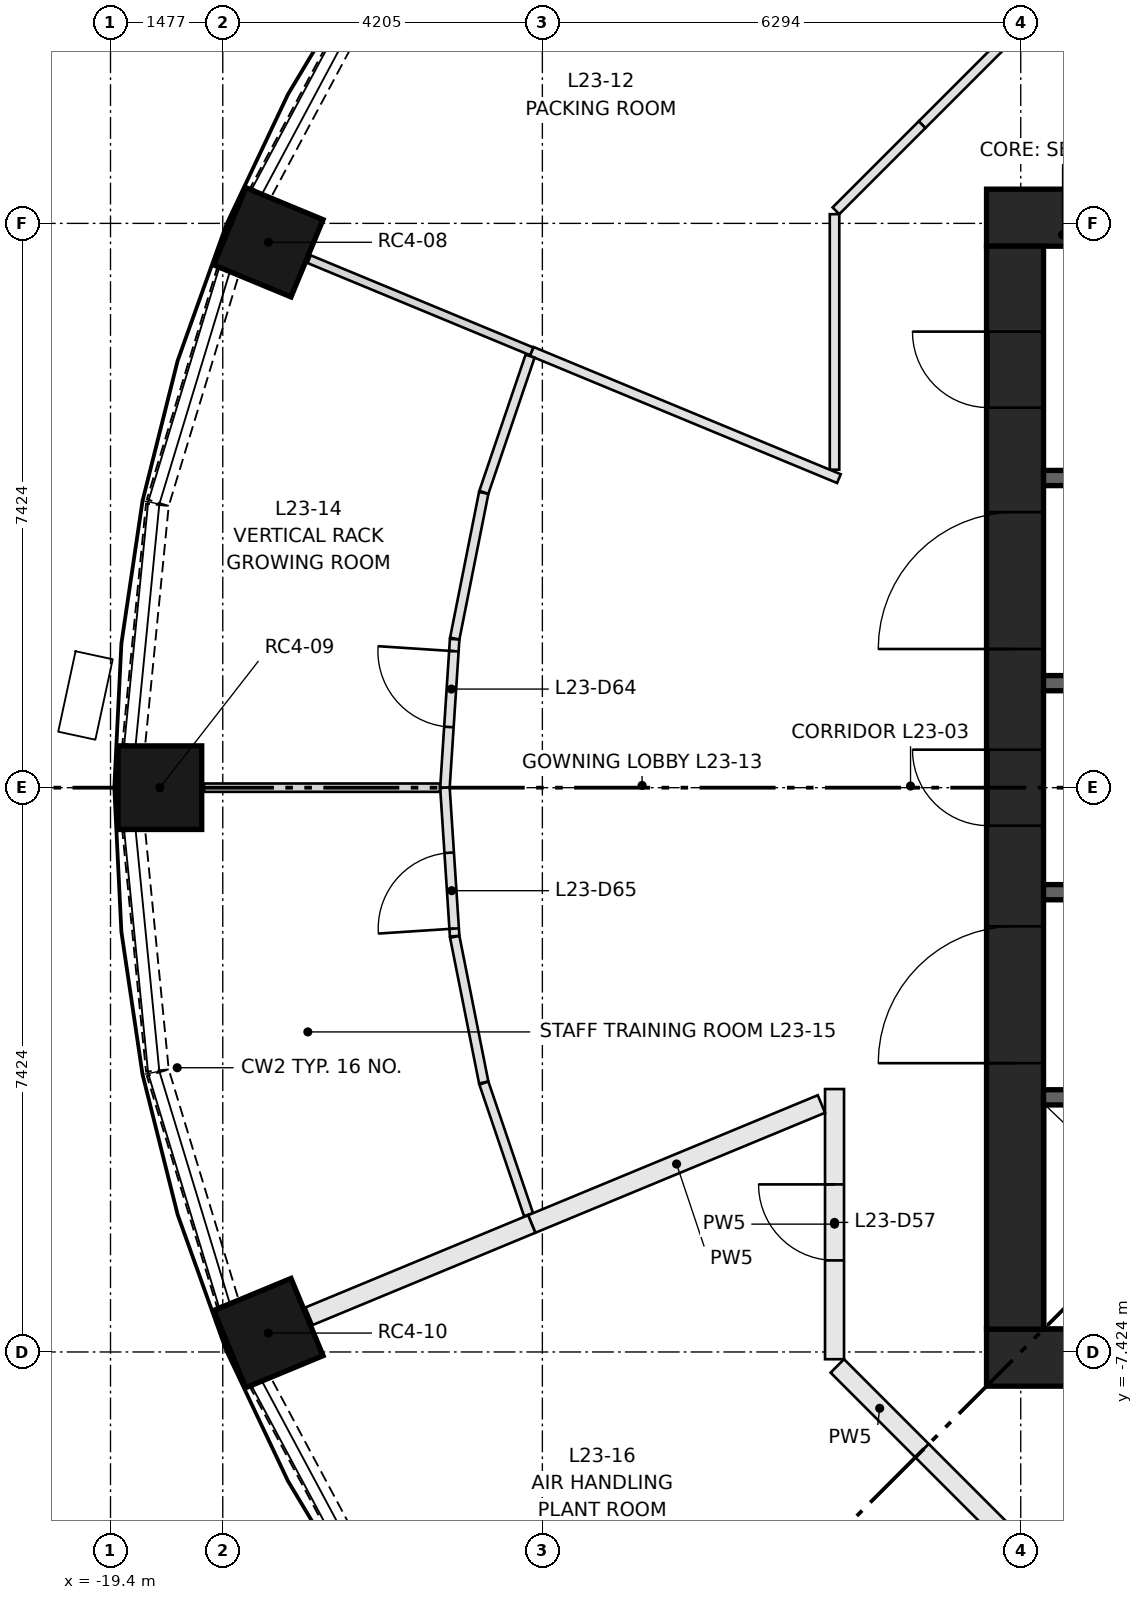
"""IFC4 building model, lengths in metres.
Left out: names, types, materials, properties, quantities, classifications, styles, units other than length and angle.
Written with IfcOpenShell. Run it as: python <this file> out.ifc"""

import sys

from ifc_helpers import new_model, si_unit, direction, frame, frame_2d, origin, origin_2d, place, context, subcontext, project, spatial, rectangle, extrude, element, fill, save


model = new_model("IFC4")
c1 = context("Model", 3, precision=1e-05, world=origin(), true_north=direction((0.0, 1.0)))
c2 = subcontext(c1, "Body", "Model", "MODEL_VIEW")
j1 = project(units=[si_unit("LENGTHUNIT", "METRE"), si_unit("PLANEANGLEUNIT", "RADIAN")], contexts=[c1])
p1 = place(None, origin())
s1 = spatial("IfcSite", under=j1, at=p1, CompositionType="ELEMENT")
p2 = place(p1, origin())
s2 = spatial("IfcBuilding", under=s1, at=p2, CompositionType="ELEMENT")
p3 = place(p2, frame((0.0, 0.0, 91.0)))
s3 = spatial("IfcBuildingStorey", under=s2, at=p3, CompositionType="ELEMENT", Elevation=91.0)
for number, where, z_axis, x_axis in (
    (1, (-17.323, 7.175, 0.0), (0.0, 0.0, 1.0), (-0.924, 0.383, 0.0)),
    (2, (-18.75, 0.0, 0.0), (0.0, 0.0, 1.0), (-1.0, 0.0, 0.0)),
    (3, (-17.323, -7.175, 0.0), (0.0, 0.0, 1.0), (-0.924, -0.383, 0.0)),
):
    element("IfcColumn", number, at=place(p3, frame(where, z_axis=z_axis, x_axis=x_axis)), inside=s3, PredefinedType="COLUMN", context=c2, shape_type="SweptSolid", body=[
        extrude(rectangle(XDim=1.1, YDim=1.1, at=origin_2d()), origin(), (0.0, 0.0, 1.0), 3.65),
    ])
for number, where, z_axis, x_axis in (
    (4, (-7.874, -7.499, 0.0), (0.0, 0.0, 1.0), (1.0, 0.0, 0.0)),
    (5, (-7.874, 7.499, 0.0), (0.0, 0.0, 1.0), (1.0, 0.0, 0.0)),
):
    element("IfcWall", number, at=place(p3, frame(where, z_axis=z_axis, x_axis=x_axis)), inside=s3, PredefinedType="SHEAR", context=c2, shape_type="SweptSolid", body=[
        extrude(rectangle(XDim=15.748, YDim=0.75, at=frame_2d((7.874, 0.0))), origin(), (0.0, 0.0, 1.0), 3.65),
    ])
p4 = place(p3, frame((-7.499, -7.124, 0.0), z_axis=(0.0, 0.0, 1.0), x_axis=(0.0, 1.0, 0.0)))
e6 = element("IfcWall", 6, at=p4, inside=s3, PredefinedType="SHEAR", context=c2, shape_type="SweptSolid", body=[
    extrude(rectangle(XDim=14.248, YDim=0.75, at=frame_2d((7.124, 0.0))), origin(), (0.0, 0.0, 1.0), 3.65),
])
p5 = place(p4, frame((6.624, 0.0, 0.0)))
e7 = element("IfcOpeningElement", 7, at=p5, cuts=e6, PredefinedType="OPENING", context=c2, shape_type="SweptSolid", body=[
    extrude(rectangle(XDim=1.0, YDim=2.1, at=frame_2d((0.5, 1.05))), frame((0.0, 0.385, 0.0), z_axis=(0.0, -1.0, 0.0), x_axis=(1.0, 0.0, 0.0)), (0.0, 0.0, 1.0), 0.77),
])
p6 = place(p4, frame((3.5, 0.0, 0.0)))
e8 = element("IfcOpeningElement", 8, at=p6, cuts=e6, PredefinedType="OPENING", context=c2, shape_type="SweptSolid", body=[
    extrude(rectangle(XDim=1.8, YDim=2.1, at=frame_2d((0.9, 1.05))), frame((0.0, 0.385, 0.0), z_axis=(0.0, -1.0, 0.0), x_axis=(1.0, 0.0, 0.0)), (0.0, 0.0, 1.0), 0.77),
])
p7 = place(p4, frame((8.948, 0.0, 0.0)))
e9 = element("IfcOpeningElement", 9, at=p7, cuts=e6, PredefinedType="OPENING", context=c2, shape_type="SweptSolid", body=[
    extrude(rectangle(XDim=1.8, YDim=2.1, at=frame_2d((0.9, 1.05))), frame((0.0, 0.385, 0.0), z_axis=(0.0, -1.0, 0.0), x_axis=(1.0, 0.0, 0.0)), (0.0, 0.0, 1.0), 0.77),
])
p8 = place(p4, frame((12.124, 0.0, 0.0)))
e10 = element("IfcOpeningElement", 10, at=p8, cuts=e6, PredefinedType="OPENING", context=c2, shape_type="SweptSolid", body=[
    extrude(rectangle(XDim=1.0, YDim=2.1, at=frame_2d((0.5, 1.05))), frame((0.0, 0.385, 0.0), z_axis=(0.0, -1.0, 0.0), x_axis=(1.0, 0.0, 0.0)), (0.0, 0.0, 1.0), 0.77),
])
p9 = place(p3, frame((-7.124, -4.074, 0.0), z_axis=(0.0, 0.0, 1.0), x_axis=(1.0, 0.0, 0.0)))
e11 = element("IfcWall", 11, at=p9, inside=s3, PredefinedType="SHEAR", context=c2, shape_type="SweptSolid", body=[
    extrude(rectangle(XDim=14.248, YDim=0.2, at=frame_2d((7.124, 0.0))), origin(), (0.0, 0.0, 1.0), 3.3),
])
p10 = place(p9, frame((1.069, 0.0, 0.0)))
e12 = element("IfcOpeningElement", 12, at=p10, cuts=e11, PredefinedType="OPENING", context=c2, shape_type="SweptSolid", body=[
    extrude(rectangle(XDim=1.1, YDim=2.1, at=frame_2d((0.55, 1.05))), frame((0.0, 0.11, 0.0), z_axis=(0.0, -1.0, 0.0), x_axis=(1.0, 0.0, 0.0)), (0.0, 0.0, 1.0), 0.22),
])
p11 = place(p9, frame((4.206, 0.0, 0.0)))
e13 = element("IfcOpeningElement", 13, at=p11, cuts=e11, PredefinedType="OPENING", context=c2, shape_type="SweptSolid", body=[
    extrude(rectangle(XDim=1.1, YDim=2.1, at=frame_2d((0.55, 1.05))), frame((0.0, 0.11, 0.0), z_axis=(0.0, -1.0, 0.0), x_axis=(1.0, 0.0, 0.0)), (0.0, 0.0, 1.0), 0.22),
])
p12 = place(p9, frame((6.808, 0.0, 0.0)))
e14 = element("IfcOpeningElement", 14, at=p12, cuts=e11, PredefinedType="OPENING", context=c2, shape_type="SweptSolid", body=[
    extrude(rectangle(XDim=1.0, YDim=2.1, at=frame_2d((0.5, 1.05))), frame((0.0, 0.11, 0.0), z_axis=(0.0, -1.0, 0.0), x_axis=(1.0, 0.0, 0.0)), (0.0, 0.0, 1.0), 0.22),
])
p13 = place(p9, frame((8.777, 0.0, 0.0)))
e15 = element("IfcOpeningElement", 15, at=p13, cuts=e11, PredefinedType="OPENING", context=c2, shape_type="SweptSolid", body=[
    extrude(rectangle(XDim=1.0, YDim=2.1, at=frame_2d((0.5, 1.05))), frame((0.0, 0.11, 0.0), z_axis=(0.0, -1.0, 0.0), x_axis=(1.0, 0.0, 0.0)), (0.0, 0.0, 1.0), 0.22),
])
p14 = place(p9, frame((10.745, 0.0, 0.0)))
e16 = element("IfcOpeningElement", 16, at=p14, cuts=e11, PredefinedType="OPENING", context=c2, shape_type="SweptSolid", body=[
    extrude(rectangle(XDim=1.0, YDim=2.1, at=frame_2d((0.5, 1.05))), frame((0.0, 0.11, 0.0), z_axis=(0.0, -1.0, 0.0), x_axis=(1.0, 0.0, 0.0)), (0.0, 0.0, 1.0), 0.22),
])
p15 = place(p9, frame((12.714, 0.0, 0.0)))
e17 = element("IfcOpeningElement", 17, at=p15, cuts=e11, PredefinedType="OPENING", context=c2, shape_type="SweptSolid", body=[
    extrude(rectangle(XDim=1.0, YDim=2.1, at=frame_2d((0.5, 1.05))), frame((0.0, 0.11, 0.0), z_axis=(0.0, -1.0, 0.0), x_axis=(1.0, 0.0, 0.0)), (0.0, 0.0, 1.0), 0.22),
])
p16 = place(p3, frame((-7.124, 4.074, 0.0), z_axis=(0.0, 0.0, 1.0), x_axis=(1.0, 0.0, 0.0)))
e18 = element("IfcWall", 18, at=p16, inside=s3, PredefinedType="SHEAR", context=c2, shape_type="SweptSolid", body=[
    extrude(rectangle(XDim=7.124, YDim=0.2, at=frame_2d((3.562, 0.0))), origin(), (0.0, 0.0, 1.0), 3.3),
])
for number, where, z_axis, x_axis in (
    (19, (-7.124, -1.375, 0.0), (0.0, 0.0, 1.0), (1.0, 0.0, 0.0)),
    (20, (-7.124, 1.375, 0.0), (0.0, 0.0, 1.0), (1.0, 0.0, 0.0)),
):
    element("IfcWall", number, at=place(p3, frame(where, z_axis=z_axis, x_axis=x_axis)), inside=s3, PredefinedType="SHEAR", context=c2, shape_type="SweptSolid", body=[
        extrude(rectangle(XDim=2.75, YDim=0.2, at=frame_2d((1.375, 0.0))), origin(), (0.0, 0.0, 1.0), 3.3),
    ])
p17 = place(p3, frame((-15.929, 10.626, 0.0), z_axis=(0.0, 0.0, 1.0), x_axis=(-0.471458802606, -0.88188808669, 0.0)))
e21 = element("IfcWall", 21, at=p17, inside=s3, PredefinedType="SOLIDWALL", context=c2, shape_type="SweptSolid", body=[
    extrude(rectangle(XDim=3.172, YDim=0.3, at=frame_2d((1.586, 0.0))), origin(), (0.0, 0.0, 1.0), 0.9),
])
p18 = place(p3, frame((-17.856, 6.787, 0.0), z_axis=(0.0, 0.0, 1.0), x_axis=(-0.290325591482, -0.956927923582, 0.0)))
e22 = element("IfcWall", 22, at=p18, inside=s3, PredefinedType="SOLIDWALL", context=c2, shape_type="SweptSolid", body=[
    extrude(rectangle(XDim=3.173, YDim=0.3, at=frame_2d((1.586, 0.0))), origin(), (0.0, 0.0, 1.0), 0.9),
])
for number, where, z_axis, x_axis in (
    (23, (-18.783, 3.721, 0.0), (0.0, 0.0, 1.0), (-0.098, -0.995, 0.0)),
    (24, (-19.094, -0.564, 0.0), (0.0, 0.0, 1.0), (0.098, -0.995, 0.0)),
):
    element("IfcWall", number, at=place(p3, frame(where, z_axis=z_axis, x_axis=x_axis)), inside=s3, PredefinedType="SOLIDWALL", context=c2, shape_type="SweptSolid", body=[
        extrude(rectangle(XDim=3.173, YDim=0.3, at=frame_2d((1.586, 0.0))), origin(), (0.0, 0.0, 1.0), 0.9),
    ])
p19 = place(p3, frame((-18.778, -3.75, 0.0), z_axis=(0.0, 0.0, 1.0), x_axis=(0.290325591482, -0.956927923582, 0.0)))
e25 = element("IfcWall", 25, at=p19, inside=s3, PredefinedType="SOLIDWALL", context=c2, shape_type="SweptSolid", body=[
    extrude(rectangle(XDim=3.173, YDim=0.3, at=frame_2d((1.586, 0.0))), origin(), (0.0, 0.0, 1.0), 0.9),
])
p20 = place(p3, frame((-17.425, -7.828, 0.0), z_axis=(0.0, 0.0, 1.0), x_axis=(0.471458802606, -0.88188808669, 0.0)))
e26 = element("IfcWall", 26, at=p20, inside=s3, PredefinedType="SOLIDWALL", context=c2, shape_type="SweptSolid", body=[
    extrude(rectangle(XDim=3.172, YDim=0.3, at=frame_2d((1.586, 0.0))), origin(), (0.0, 0.0, 1.0), 0.9),
])
p21 = place(p3, frame((-8.722, 8.722, 0.0), z_axis=(0.0, 0.0, 1.0), x_axis=(0.707030604857, 0.70718294931, 0.0)))
e27 = element("IfcWall", 27, at=p21, inside=s3, PredefinedType="PARTITIONING", context=c2, shape_type="SweptSolid", body=[
    extrude(rectangle(XDim=1.603, YDim=0.125, at=frame_2d((0.801, 0.0))), origin(), (0.0, 0.0, 1.0), 3.3),
])
p22 = place(p3, frame((-9.874, 4.183, 0.0), z_axis=(0.0, 0.0, 1.0), x_axis=(0.0, 1.0, 0.0)))
e28 = element("IfcWall", 28, at=p22, inside=s3, PredefinedType="PARTITIONING", context=c2, shape_type="SweptSolid", body=[
    extrude(rectangle(XDim=3.362, YDim=0.125, at=frame_2d((1.681, 0.0))), origin(), (0.0, 0.0, 1.0), 3.3),
])
p23 = place(p3, frame((-9.856, 7.589, 0.0), z_axis=(0.0, 0.0, 1.0), x_axis=(0.70718294931, 0.707030604857, 0.0)))
e29 = element("IfcWall", 29, at=p23, inside=s3, PredefinedType="PARTITIONING", context=c2, shape_type="SweptSolid", body=[
    extrude(rectangle(XDim=1.603, YDim=0.125, at=frame_2d((0.801, 0.0))), origin(), (0.0, 0.0, 1.0), 3.3),
])
p24 = place(p3, frame((-9.874, -7.519, 0.0), z_axis=(0.0, 0.0, 1.0), x_axis=(0.0, 1.0, 0.0)))
e30 = element("IfcWall", 30, at=p24, inside=s3, PredefinedType="PARTITIONING", context=c2, shape_type="SweptSolid", body=[
    extrude(rectangle(XDim=3.554, YDim=0.25, at=frame_2d((1.777, 0.0))), origin(), (0.0, 0.0, 1.0), 3.3),
])
p25 = place(p24, frame((1.3, 0.0, 0.0)))
e31 = element("IfcOpeningElement", 31, at=p25, cuts=e30, PredefinedType="OPENING", context=c2, shape_type="SweptSolid", body=[
    extrude(rectangle(XDim=1.0, YDim=2.1, at=frame_2d((0.5, 1.05))), frame((0.0, 0.135, 0.0), z_axis=(0.0, -1.0, 0.0), x_axis=(1.0, 0.0, 0.0)), (0.0, 0.0, 1.0), 0.27),
])
for number, where, z_axis, x_axis in (
    (32, (-8.722, -8.722, 0.0), (0.0, 0.0, 1.0), (-0.707, 0.707, 0.0)),
    (33, (-7.608, -9.837, 0.0), (0.0, 0.0, 1.0), (-0.707, 0.707, 0.0)),
):
    element("IfcWall", number, at=place(p3, frame(where, z_axis=z_axis, x_axis=x_axis)), inside=s3, PredefinedType="PARTITIONING", context=c2, shape_type="SweptSolid", body=[
        extrude(rectangle(XDim=1.577, YDim=0.25, at=frame_2d((0.788, 0.0))), origin(), (0.0, 0.0, 1.0), 3.3),
    ])
p26 = place(p3, frame((-9.816, 4.066, 0.0), z_axis=(0.0, 0.0, 1.0), x_axis=(-0.923865829688, 0.382716512232, 0.0)))
e34 = element("IfcWall", 34, at=p26, inside=s3, PredefinedType="PARTITIONING", context=c2, shape_type="SweptSolid", body=[
    extrude(rectangle(XDim=4.375, YDim=0.125, at=frame_2d((2.188, 0.0))), origin(), (0.0, 0.0, 1.0), 3.3),
])
p27 = place(p3, frame((-13.858, 5.74, 0.0), z_axis=(0.0, 0.0, 1.0), x_axis=(-0.923876970079, 0.382689618566, 0.0)))
e35 = element("IfcWall", 35, at=p27, inside=s3, PredefinedType="PARTITIONING", context=c2, shape_type="SweptSolid", body=[
    extrude(rectangle(XDim=3.17, YDim=0.11, at=frame_2d((1.585, 0.0))), origin(), (0.0, 0.0, 1.0), 3.3),
])
p28 = place(p3, frame((-15.0, 0.0, 0.0), z_axis=(0.0, 0.0, 1.0), x_axis=(0.065335548621, 0.997863350407, 0.0)))
e36 = element("IfcWall", 36, at=p28, inside=s3, PredefinedType="PARTITIONING", context=c2, shape_type="SweptSolid", body=[
    extrude(rectangle(XDim=1.958, YDim=0.125, at=frame_2d((0.979, 0.0))), origin(), (0.0, 0.0, 1.0), 3.3),
])
p29 = place(p28, frame((0.8, 0.0, 0.0)))
e37 = element("IfcOpeningElement", 37, at=p29, cuts=e36, PredefinedType="OPENING", context=c2, shape_type="SweptSolid", body=[
    extrude(rectangle(XDim=1.0, YDim=2.1, at=frame_2d((0.5, 1.05))), frame((0.0, 0.073, 0.0), z_axis=(0.0, -1.0, 0.0), x_axis=(1.0, 0.0, 0.0)), (0.0, 0.0, 1.0), 0.145),
])
p30 = place(p3, frame((-14.871, 1.962, 0.0), z_axis=(0.0, 0.0, 1.0), x_axis=(0.195034785279, 0.980796325713, 0.0)))
e38 = element("IfcWall", 38, at=p30, inside=s3, PredefinedType="PARTITIONING", context=c2, shape_type="SweptSolid", body=[
    extrude(rectangle(XDim=1.954, YDim=0.125, at=frame_2d((0.977, 0.0))), origin(), (0.0, 0.0, 1.0), 3.3),
])
p31 = place(p3, frame((-14.488, 3.886, 0.0), z_axis=(0.0, 0.0, 1.0), x_axis=(0.321451389675, 0.946926081633, 0.0)))
e39 = element("IfcWall", 39, at=p31, inside=s3, PredefinedType="PARTITIONING", context=c2, shape_type="SweptSolid", body=[
    extrude(rectangle(XDim=1.891, YDim=0.125, at=frame_2d((0.946, 0.0))), origin(), (0.0, 0.0, 1.0), 3.3),
])
p32 = place(p3, frame((-14.872, -1.954, 0.0), z_axis=(0.0, 0.0, 1.0), x_axis=(-0.065335548621, 0.997863350407, 0.0)))
e40 = element("IfcWall", 40, at=p32, inside=s3, PredefinedType="PARTITIONING", context=c2, shape_type="SweptSolid", body=[
    extrude(rectangle(XDim=1.958, YDim=0.125, at=frame_2d((0.979, 0.0))), origin(), (0.0, 0.0, 1.0), 3.3),
])
p33 = place(p32, frame((0.1, 0.0, 0.0)))
e41 = element("IfcOpeningElement", 41, at=p33, cuts=e40, PredefinedType="OPENING", context=c2, shape_type="SweptSolid", body=[
    extrude(rectangle(XDim=1.0, YDim=2.1, at=frame_2d((0.5, 1.05))), frame((0.0, 0.073, 0.0), z_axis=(0.0, -1.0, 0.0), x_axis=(1.0, 0.0, 0.0)), (0.0, 0.0, 1.0), 0.145),
])
p34 = place(p3, frame((-14.49, -3.878, 0.0), z_axis=(0.0, 0.0, 1.0), x_axis=(-0.195034785279, 0.980796325713, 0.0)))
e42 = element("IfcWall", 42, at=p34, inside=s3, PredefinedType="PARTITIONING", context=c2, shape_type="SweptSolid", body=[
    extrude(rectangle(XDim=1.954, YDim=0.125, at=frame_2d((0.977, 0.0))), origin(), (0.0, 0.0, 1.0), 3.3),
])
p35 = place(p3, frame((-13.9, -5.618, 0.0), z_axis=(0.0, 0.0, 1.0), x_axis=(-0.321390424162, 0.946946775303, 0.0)))
e43 = element("IfcWall", 43, at=p35, inside=s3, PredefinedType="PARTITIONING", context=c2, shape_type="SweptSolid", body=[
    extrude(rectangle(XDim=1.828, YDim=0.125, at=frame_2d((0.914, 0.0))), origin(), (0.0, 0.0, 1.0), 3.3),
])
p36 = place(p3, frame((-10.047, -4.162, 0.0), z_axis=(0.0, 0.0, 1.0), x_axis=(-0.92388555685, -0.382668888001, 0.0)))
e44 = element("IfcWall", 44, at=p36, inside=s3, PredefinedType="PARTITIONING", context=c2, shape_type="SweptSolid", body=[
    extrude(rectangle(XDim=4.125, YDim=0.25, at=frame_2d((2.062, 0.0))), origin(), (0.0, 0.0, 1.0), 3.3),
])
p37 = place(p3, frame((-15.066, 0.0, 0.0), z_axis=(0.0, 0.0, 1.0), x_axis=(-1.0, 0.0, 0.0)))
e45 = element("IfcWall", 45, at=p37, inside=s3, PredefinedType="PARTITIONING", context=c2, shape_type="SweptSolid", body=[
    extrude(rectangle(XDim=3.104, YDim=0.11, at=frame_2d((1.552, 0.0))), origin(), (0.0, 0.0, 1.0), 3.3),
])
p38 = place(p3, frame((-13.858, -5.74, 0.0), z_axis=(0.0, 0.0, 1.0), x_axis=(-0.923876970079, -0.382689618566, 0.0)))
e46 = element("IfcWall", 46, at=p38, inside=s3, PredefinedType="PARTITIONING", context=c2, shape_type="SweptSolid", body=[
    extrude(rectangle(XDim=3.17, YDim=0.25, at=frame_2d((1.585, 0.0))), origin(), (0.0, 0.0, 1.0), 3.3),
])
p39 = place(p5, origin())
e47 = element("IfcDoor", 47, at=p39, inside=s3, OperationType="SINGLE_SWING_RIGHT", PredefinedType="DOOR", context=c2, shape_type="SweptSolid", body=[
    extrude(rectangle(XDim=1.0, YDim=2.1, at=frame_2d((0.5, 1.05))), frame((0.0, 0.375, 0.0), z_axis=(0.0, -1.0, 0.0), x_axis=(1.0, 0.0, 0.0)), (0.0, 0.0, 1.0), 0.05),
])
fill(e7, e47)
p40 = place(p6, origin())
e48 = element("IfcDoor", 48, at=p40, inside=s3, OperationType="DOUBLE_DOOR_SINGLE_SWING", PredefinedType="DOOR", context=c2, shape_type="SweptSolid", body=[
    extrude(rectangle(XDim=1.8, YDim=2.1, at=frame_2d((0.9, 1.05))), frame((0.0, 0.025, 0.0), z_axis=(0.0, -1.0, 0.0), x_axis=(1.0, 0.0, 0.0)), (0.0, 0.0, 1.0), 0.05),
])
fill(e8, e48)
p41 = place(p7, origin())
e49 = element("IfcDoor", 49, at=p41, inside=s3, OperationType="DOUBLE_DOOR_SINGLE_SWING", PredefinedType="DOOR", context=c2, shape_type="SweptSolid", body=[
    extrude(rectangle(XDim=1.8, YDim=2.1, at=frame_2d((0.9, 1.05))), frame((0.0, 0.025, 0.0), z_axis=(0.0, -1.0, 0.0), x_axis=(1.0, 0.0, 0.0)), (0.0, 0.0, 1.0), 0.05),
])
fill(e9, e49)
p42 = place(p8, origin())
e50 = element("IfcDoor", 50, at=p42, inside=s3, OperationType="SINGLE_SWING_RIGHT", PredefinedType="DOOR", context=c2, shape_type="SweptSolid", body=[
    extrude(rectangle(XDim=1.0, YDim=2.1, at=frame_2d((0.5, 1.05))), frame((0.0, 0.375, 0.0), z_axis=(0.0, -1.0, 0.0), x_axis=(1.0, 0.0, 0.0)), (0.0, 0.0, 1.0), 0.05),
])
fill(e10, e50)
p43 = place(p25, origin())
e51 = element("IfcDoor", 51, at=p43, inside=s3, OperationType="SINGLE_SWING_RIGHT", PredefinedType="DOOR", context=c2, shape_type="SweptSolid", body=[
    extrude(rectangle(XDim=1.0, YDim=2.1, at=frame_2d((0.5, 1.05))), frame((0.0, 0.025, 0.0), z_axis=(0.0, -1.0, 0.0), x_axis=(1.0, 0.0, 0.0)), (0.0, 0.0, 1.0), 0.05),
])
fill(e31, e51)
p44 = place(p29, origin())
e52 = element("IfcDoor", 52, at=p44, inside=s3, OperationType="SINGLE_SWING_RIGHT", PredefinedType="DOOR", context=c2, shape_type="SweptSolid", body=[
    extrude(rectangle(XDim=1.0, YDim=2.1, at=frame_2d((0.5, 1.05))), frame((0.0, 0.025, 0.0), z_axis=(0.0, -1.0, 0.0), x_axis=(1.0, 0.0, 0.0)), (0.0, 0.0, 1.0), 0.05),
])
fill(e37, e52)
p45 = place(p33, origin())
e53 = element("IfcDoor", 53, at=p45, inside=s3, OperationType="SINGLE_SWING_LEFT", PredefinedType="DOOR", context=c2, shape_type="SweptSolid", body=[
    extrude(rectangle(XDim=1.0, YDim=2.1, at=frame_2d((0.5, 1.05))), frame((0.0, 0.025, 0.0), z_axis=(0.0, -1.0, 0.0), x_axis=(1.0, 0.0, 0.0)), (0.0, 0.0, 1.0), 0.05),
])
fill(e41, e53)
save(model, sys.argv[1])
